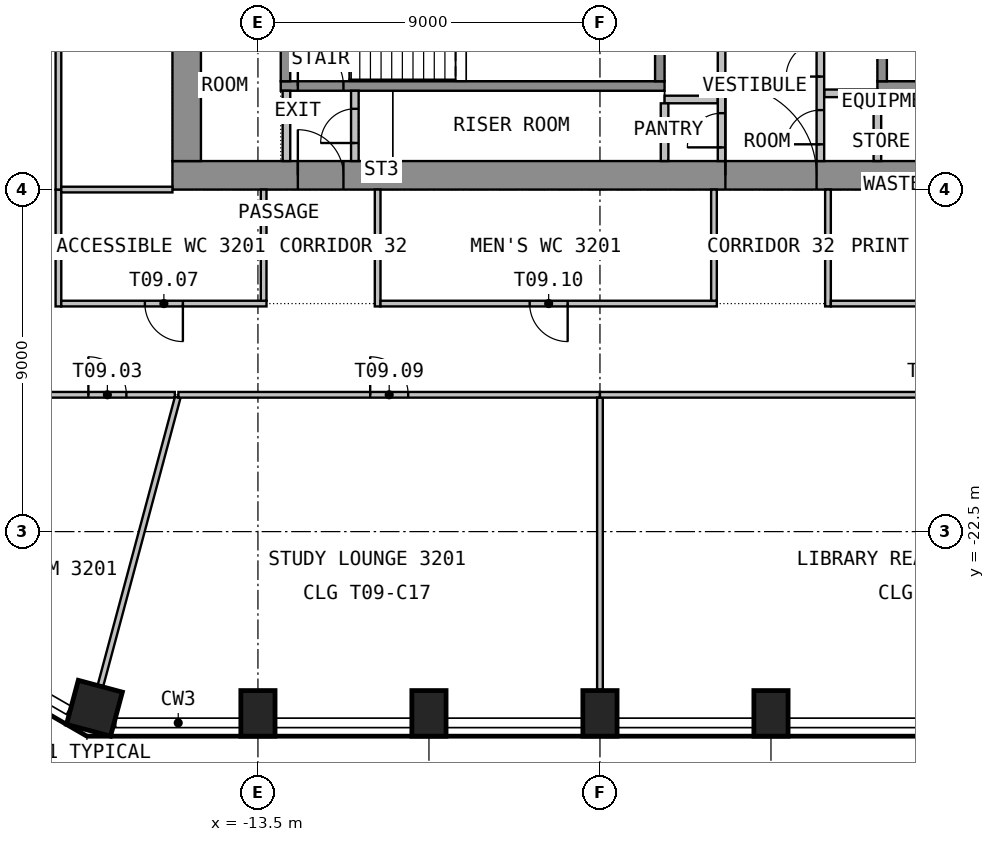
"""IFC4 building model, lengths in metres.
Left out: names, types, materials, properties, quantities, classifications, styles, units other than length and angle.
Written with IfcOpenShell. Run it as: python <this file> out.ifc"""

import sys

from ifc_helpers import new_model, si_unit, direction, frame, frame_2d, origin, origin_2d, place, context, subcontext, project, spatial, rectangle, extrude, element, fill, save


model = new_model("IFC4")
c1 = context("Model", 3, precision=1e-05, world=origin(), true_north=direction((0.0, 1.0)))
c2 = subcontext(c1, "Body", "Model", "MODEL_VIEW")
j1 = project(units=[si_unit("LENGTHUNIT", "METRE"), si_unit("PLANEANGLEUNIT", "RADIAN")], contexts=[c1])
p1 = place(None, origin())
s1 = spatial("IfcSite", under=j1, at=p1, CompositionType="ELEMENT")
p2 = place(p1, origin())
s2 = spatial("IfcBuilding", under=s1, at=p2, CompositionType="ELEMENT")
p3 = place(p2, frame((0.0, 0.0, 132.6)))
s3 = spatial("IfcBuildingStorey", under=s2, at=p3, CompositionType="ELEMENT", Elevation=132.6)
p4 = place(p3, frame((-17.803, -27.148, 0.0), z_axis=(0.0, 0.0, 1.0), x_axis=(0.965925826289, -0.258819045103, 0.0)))
e1 = element("IfcColumn", 1, at=p4, inside=s3, PredefinedType="COLUMN", context=c2, shape_type="SweptSolid", body=[
    extrude(rectangle(XDim=1.2, YDim=1.2, at=origin_2d()), origin(), (0.0, 0.0, 1.0), 3.575),
])
for number, where, z_axis, x_axis in (
    (2, (-13.5, -27.283, 0.0), (0.0, 0.0, 1.0), (1.0, 0.0, 0.0)),
    (3, (-9.0, -27.283, 0.0), (0.0, 0.0, 1.0), (1.0, 0.0, 0.0)),
    (4, (-4.5, -27.283, 0.0), (0.0, 0.0, 1.0), (1.0, 0.0, 0.0)),
    (5, (0.0, -27.283, 0.0), (0.0, 0.0, 1.0), (1.0, 0.0, 0.0)),
):
    element("IfcColumn", number, at=place(p3, frame(where, z_axis=z_axis, x_axis=x_axis)), inside=s3, PredefinedType="COLUMN", context=c2, shape_type="SweptSolid", body=[
        extrude(rectangle(XDim=0.9, YDim=1.2, at=origin_2d()), origin(), (0.0, 0.0, 1.0), 3.575),
    ])
p5 = place(p3, frame((-15.75, -13.125, 0.0), z_axis=(0.0, 0.0, 1.0), x_axis=(1.0, 0.0, 0.0)))
e6 = element("IfcWall", 6, at=p5, inside=s3, PredefinedType="SHEAR", context=c2, shape_type="SweptSolid", body=[
    extrude(rectangle(XDim=31.5, YDim=0.75, at=frame_2d((15.75, 0.0))), origin(), (0.0, 0.0, 1.0), 3.575),
])
p6 = place(p5, frame((14.55, 0.0, 0.0)))
e7 = element("IfcOpeningElement", 7, at=p6, cuts=e6, PredefinedType="OPENING", context=c2, shape_type="SweptSolid", body=[
    extrude(rectangle(XDim=2.4, YDim=2.1, at=frame_2d((1.2, 1.05))), frame((0.0, 0.385, 0.0), z_axis=(0.0, -1.0, 0.0), x_axis=(1.0, 0.0, 0.0)), (0.0, 0.0, 1.0), 0.77),
])
p7 = place(p5, frame((3.3, 0.0, 0.0)))
e8 = element("IfcOpeningElement", 8, at=p7, cuts=e6, PredefinedType="OPENING", context=c2, shape_type="SweptSolid", body=[
    extrude(rectangle(XDim=1.2, YDim=2.1, at=frame_2d((0.6, 1.05))), frame((0.0, 0.385, 0.0), z_axis=(0.0, -1.0, 0.0), x_axis=(1.0, 0.0, 0.0)), (0.0, 0.0, 1.0), 0.77),
])
p8 = place(p5, frame((27.0, 0.0, 0.0)))
e9 = element("IfcOpeningElement", 9, at=p8, cuts=e6, PredefinedType="OPENING", context=c2, shape_type="SweptSolid", body=[
    extrude(rectangle(XDim=1.2, YDim=2.1, at=frame_2d((0.6, 1.05))), frame((0.0, 0.385, 0.0), z_axis=(0.0, -1.0, 0.0), x_axis=(1.0, 0.0, 0.0)), (0.0, 0.0, 1.0), 0.77),
])
p9 = place(p3, frame((-15.375, -12.75, 0.0), z_axis=(0.0, 0.0, 1.0), x_axis=(0.0, 1.0, 0.0)))
e10 = element("IfcWall", 10, at=p9, inside=s3, PredefinedType="SHEAR", context=c2, shape_type="SweptSolid", body=[
    extrude(rectangle(XDim=25.5, YDim=0.75, at=frame_2d((12.75, 0.0))), origin(), (0.0, 0.0, 1.0), 3.575),
])
p10 = place(p9, frame((11.55, 0.0, 0.0)))
e11 = element("IfcOpeningElement", 11, at=p10, cuts=e10, PredefinedType="OPENING", context=c2, shape_type="SweptSolid", body=[
    extrude(rectangle(XDim=2.4, YDim=2.1, at=frame_2d((1.2, 1.05))), frame((0.0, 0.385, 0.0), z_axis=(0.0, -1.0, 0.0), x_axis=(1.0, 0.0, 0.0)), (0.0, 0.0, 1.0), 0.77),
])
p11 = place(p3, frame((-12.9, -10.775, 0.0), z_axis=(0.0, 0.0, 1.0), x_axis=(1.0, 0.0, 0.0)))
e12 = element("IfcWall", 12, at=p11, inside=s3, PredefinedType="SHEAR", context=c2, shape_type="SweptSolid", body=[
    extrude(rectangle(XDim=10.1, YDim=0.25, at=frame_2d((5.05, 0.0))), origin(), (0.0, 0.0, 1.0), 3.575),
])
p12 = place(p11, frame((0.45, 0.0, 0.0)))
e13 = element("IfcOpeningElement", 13, at=p12, cuts=e12, PredefinedType="OPENING", context=c2, shape_type="SweptSolid", body=[
    extrude(rectangle(XDim=1.2, YDim=2.1, at=frame_2d((0.6, 1.05))), frame((0.0, 0.135, 0.0), z_axis=(0.0, -1.0, 0.0), x_axis=(1.0, 0.0, 0.0)), (0.0, 0.0, 1.0), 0.27),
])
for number, where, z_axis, x_axis in (
    (14, (-12.775, -10.65, 0.0), (0.0, 0.0, 1.0), (0.0, 1.0, 0.0)),
    (15, (-2.925, -10.65, 0.0), (0.0, 0.0, 1.0), (0.0, 1.0, 0.0)),
):
    element("IfcWall", number, at=place(p3, frame(where, z_axis=z_axis, x_axis=x_axis)), inside=s3, PredefinedType="SHEAR", context=c2, shape_type="SweptSolid", body=[
        extrude(rectangle(XDim=3.25, YDim=0.25, at=frame_2d((1.625, 0.0))), origin(), (0.0, 0.0, 1.0), 3.575),
    ])
p13 = place(p3, frame((2.8, -10.775, 0.0), z_axis=(0.0, 0.0, 1.0), x_axis=(1.0, 0.0, 0.0)))
e16 = element("IfcWall", 16, at=p13, inside=s3, PredefinedType="SHEAR", context=c2, shape_type="SweptSolid", body=[
    extrude(rectangle(XDim=10.1, YDim=0.25, at=frame_2d((5.05, 0.0))), origin(), (0.0, 0.0, 1.0), 3.575),
])
p14 = place(p13, frame((8.45, 0.0, 0.0)))
e17 = element("IfcOpeningElement", 17, at=p14, cuts=e16, PredefinedType="OPENING", context=c2, shape_type="SweptSolid", body=[
    extrude(rectangle(XDim=1.2, YDim=2.1, at=frame_2d((0.6, 1.05))), frame((0.0, 0.135, 0.0), z_axis=(0.0, -1.0, 0.0), x_axis=(1.0, 0.0, 0.0)), (0.0, 0.0, 1.0), 0.27),
])
p15 = place(p3, frame((2.925, -10.65, 0.0), z_axis=(0.0, 0.0, 1.0), x_axis=(0.0, 1.0, 0.0)))
e18 = element("IfcWall", 18, at=p15, inside=s3, PredefinedType="SHEAR", context=c2, shape_type="SweptSolid", body=[
    extrude(rectangle(XDim=3.25, YDim=0.25, at=frame_2d((1.625, 0.0))), origin(), (0.0, 0.0, 1.0), 3.575),
])
for number, where, z_axis, x_axis in (
    (19, (-2.8, -11.13, 0.0), (0.0, 0.0, 1.0), (1.0, 0.0, 0.0)),
    (20, (1.4, -10.968, 0.0), (0.0, 0.0, 1.0), (1.0, 0.0, 0.0)),
):
    element("IfcWall", number, at=place(p3, frame(where, z_axis=z_axis, x_axis=x_axis)), inside=s3, PredefinedType="PARTITIONING", context=c2, shape_type="SweptSolid", body=[
        extrude(rectangle(XDim=1.4, YDim=0.2, at=frame_2d((0.7, 0.0))), origin(), (0.0, 0.0, 1.0), 3.575),
    ])
p16 = place(p3, frame((-1.3, -12.75, 0.0), z_axis=(0.0, 0.0, 1.0), x_axis=(0.0, 1.0, 0.0)))
e21 = element("IfcWall", 21, at=p16, inside=s3, PredefinedType="PARTITIONING", context=c2, shape_type="SweptSolid", body=[
    extrude(rectangle(XDim=5.6, YDim=0.2, at=frame_2d((2.8, 0.0))), origin(), (0.0, 0.0, 1.0), 3.575),
])
p17 = place(p16, frame((0.36, 0.0, 0.0)))
e22 = element("IfcOpeningElement", 22, at=p17, cuts=e21, PredefinedType="OPENING", context=c2, shape_type="SweptSolid", body=[
    extrude(rectangle(XDim=0.9, YDim=2.1, at=frame_2d((0.45, 1.05))), frame((0.0, 0.11, 0.0), z_axis=(0.0, -1.0, 0.0), x_axis=(1.0, 0.0, 0.0)), (0.0, 0.0, 1.0), 0.22),
])
p18 = place(p16, frame((3.06, 0.0, 0.0)))
e23 = element("IfcOpeningElement", 23, at=p18, cuts=e21, PredefinedType="OPENING", context=c2, shape_type="SweptSolid", body=[
    extrude(rectangle(XDim=0.9, YDim=2.1, at=frame_2d((0.45, 1.05))), frame((0.0, 0.11, 0.0), z_axis=(0.0, -1.0, 0.0), x_axis=(1.0, 0.0, 0.0)), (0.0, 0.0, 1.0), 0.22),
])
p19 = place(p3, frame((1.3, -12.75, 0.0), z_axis=(0.0, 0.0, 1.0), x_axis=(0.0, 1.0, 0.0)))
e24 = element("IfcWall", 24, at=p19, inside=s3, PredefinedType="PARTITIONING", context=c2, shape_type="SweptSolid", body=[
    extrude(rectangle(XDim=5.6, YDim=0.2, at=frame_2d((2.8, 0.0))), origin(), (0.0, 0.0, 1.0), 3.575),
])
p20 = place(p19, frame((0.441, 0.0, 0.0)))
e25 = element("IfcOpeningElement", 25, at=p20, cuts=e24, PredefinedType="OPENING", context=c2, shape_type="SweptSolid", body=[
    extrude(rectangle(XDim=0.9, YDim=2.1, at=frame_2d((0.45, 1.05))), frame((0.0, 0.11, 0.0), z_axis=(0.0, -1.0, 0.0), x_axis=(1.0, 0.0, 0.0)), (0.0, 0.0, 1.0), 0.22),
])
p21 = place(p19, frame((2.223, 0.0, 0.0)))
e26 = element("IfcOpeningElement", 26, at=p21, cuts=e24, PredefinedType="OPENING", context=c2, shape_type="SweptSolid", body=[
    extrude(rectangle(XDim=0.9, YDim=2.1, at=frame_2d((0.45, 1.05))), frame((0.0, 0.11, 0.0), z_axis=(0.0, -1.0, 0.0), x_axis=(1.0, 0.0, 0.0)), (0.0, 0.0, 1.0), 0.22),
])
p22 = place(p19, frame((4.032, 0.0, 0.0)))
e27 = element("IfcOpeningElement", 27, at=p22, cuts=e24, PredefinedType="OPENING", context=c2, shape_type="SweptSolid", body=[
    extrude(rectangle(XDim=0.9, YDim=2.1, at=frame_2d((0.45, 1.05))), frame((0.0, 0.11, 0.0), z_axis=(0.0, -1.0, 0.0), x_axis=(1.0, 0.0, 0.0)), (0.0, 0.0, 1.0), 0.22),
])
p23 = place(p3, frame((-12.75, -12.75, 0.0), z_axis=(0.0, 0.0, 1.0), x_axis=(0.0, 1.0, 0.0)))
e28 = element("IfcWall", 28, at=p23, inside=s3, PredefinedType="PARTITIONING", context=c2, shape_type="SweptSolid", body=[
    extrude(rectangle(XDim=1.85, YDim=0.2, at=frame_2d((0.925, 0.0))), origin(), (0.0, 0.0, 1.0), 3.575),
])
p24 = place(p3, frame((-10.95, -12.75, 0.0), z_axis=(0.0, 0.0, 1.0), x_axis=(0.0, 1.0, 0.0)))
e29 = element("IfcWall", 29, at=p24, inside=s3, PredefinedType="PARTITIONING", context=c2, shape_type="SweptSolid", body=[
    extrude(rectangle(XDim=1.85, YDim=0.2, at=frame_2d((0.925, 0.0))), origin(), (0.0, 0.0, 1.0), 3.575),
])
p25 = place(p24, frame((0.475, 0.0, 0.0)))
e30 = element("IfcOpeningElement", 30, at=p25, cuts=e29, PredefinedType="OPENING", context=c2, shape_type="SweptSolid", body=[
    extrude(rectangle(XDim=0.9, YDim=2.1, at=frame_2d((0.45, 1.05))), frame((0.0, 0.11, 0.0), z_axis=(0.0, -1.0, 0.0), x_axis=(1.0, 0.0, 0.0)), (0.0, 0.0, 1.0), 0.22),
])
p26 = place(p3, frame((-19.236, -18.9, 0.0), z_axis=(0.0, 0.0, 1.0), x_axis=(1.0, 0.0, 0.0)))
e31 = element("IfcWall", 31, at=p26, inside=s3, PredefinedType="PARTITIONING", context=c2, shape_type="SweptSolid", body=[
    extrude(rectangle(XDim=3.548, YDim=0.15, at=frame_2d((1.774, 0.0))), origin(), (0.0, 0.0, 1.0), 3.575),
])
p27 = place(p26, frame((1.274, 0.0, 0.0)))
e32 = element("IfcOpeningElement", 32, at=p27, cuts=e31, PredefinedType="OPENING", context=c2, shape_type="SweptSolid", body=[
    extrude(rectangle(XDim=1.0, YDim=2.1, at=frame_2d((0.5, 1.05))), frame((0.0, 0.085, 0.0), z_axis=(0.0, -1.0, 0.0), x_axis=(1.0, 0.0, 0.0)), (0.0, 0.0, 1.0), 0.17),
])
p28 = place(p3, frame((-18.75, -16.575, 0.0), z_axis=(0.0, 0.0, 1.0), x_axis=(0.0, 1.0, 0.0)))
e33 = element("IfcWall", 33, at=p28, inside=s3, PredefinedType="PARTITIONING", context=c2, shape_type="SweptSolid", body=[
    extrude(rectangle(XDim=3.075, YDim=0.15, at=frame_2d((1.538, 0.0))), origin(), (0.0, 0.0, 1.0), 3.575),
])
p29 = place(p3, frame((-13.275, -16.5, 0.0), z_axis=(0.0, 0.0, 1.0), x_axis=(-1.0, 0.0, 0.0)))
e34 = element("IfcWall", 34, at=p29, inside=s3, PredefinedType="PARTITIONING", context=c2, shape_type="SweptSolid", body=[
    extrude(rectangle(XDim=5.4, YDim=0.15, at=frame_2d((2.7, 0.0))), origin(), (0.0, 0.0, 1.0), 3.575),
])
p30 = place(p29, frame((2.2, 0.0, 0.0)))
e35 = element("IfcOpeningElement", 35, at=p30, cuts=e34, PredefinedType="OPENING", context=c2, shape_type="SweptSolid", body=[
    extrude(rectangle(XDim=1.0, YDim=2.1, at=frame_2d((0.5, 1.05))), frame((0.0, 0.085, 0.0), z_axis=(0.0, -1.0, 0.0), x_axis=(1.0, 0.0, 0.0)), (0.0, 0.0, 1.0), 0.17),
])
p31 = place(p3, frame((-18.75, -13.5, 0.0), z_axis=(0.0, 0.0, 1.0), x_axis=(0.0, 1.0, 0.0)))
e36 = element("IfcWall", 36, at=p31, inside=s3, PredefinedType="PARTITIONING", context=c2, shape_type="SweptSolid", body=[
    extrude(rectangle(XDim=12.075, YDim=0.15, at=frame_2d((6.038, 0.0))), origin(), (0.0, 0.0, 1.0), 3.575),
])
p32 = place(p31, frame((5.538, 0.0, 0.0)))
e37 = element("IfcOpeningElement", 37, at=p32, cuts=e36, PredefinedType="OPENING", context=c2, shape_type="SweptSolid", body=[
    extrude(rectangle(XDim=1.0, YDim=2.1, at=frame_2d((0.5, 1.05))), frame((0.0, 0.085, 0.0), z_axis=(0.0, -1.0, 0.0), x_axis=(1.0, 0.0, 0.0)), (0.0, 0.0, 1.0), 0.17),
])
p33 = place(p3, frame((-15.75, -13.5, 0.0), z_axis=(0.0, 0.0, 1.0), x_axis=(-1.0, 0.0, 0.0)))
e38 = element("IfcWall", 38, at=p33, inside=s3, PredefinedType="PARTITIONING", context=c2, shape_type="SweptSolid", body=[
    extrude(rectangle(XDim=2.925, YDim=0.15, at=frame_2d((1.462, 0.0))), origin(), (0.0, 0.0, 1.0), 3.575),
])
p34 = place(p3, frame((-15.612, -18.972, 0.0), z_axis=(0.0, 0.0, 1.0), x_axis=(-0.258869363255, -0.965912342176, 0.0)))
e39 = element("IfcWall", 39, at=p34, inside=s3, PredefinedType="PARTITIONING", context=c2, shape_type="SweptSolid", body=[
    extrude(rectangle(XDim=7.844, YDim=0.15, at=frame_2d((3.922, 0.0))), origin(), (0.0, 0.0, 1.0), 3.575),
])
p35 = place(p3, frame((-15.593, -18.9, 0.0), z_axis=(0.0, 0.0, 1.0), x_axis=(1.0, 0.0, 0.0)))
e40 = element("IfcWall", 40, at=p35, inside=s3, PredefinedType="PARTITIONING", context=c2, shape_type="SweptSolid", body=[
    extrude(rectangle(XDim=11.093, YDim=0.15, at=frame_2d((5.546, 0.0))), origin(), (0.0, 0.0, 1.0), 3.575),
])
p36 = place(p35, frame((5.046, 0.0, 0.0)))
e41 = element("IfcOpeningElement", 41, at=p36, cuts=e40, PredefinedType="OPENING", context=c2, shape_type="SweptSolid", body=[
    extrude(rectangle(XDim=1.0, YDim=2.1, at=frame_2d((0.5, 1.05))), frame((0.0, 0.085, 0.0), z_axis=(0.0, -1.0, 0.0), x_axis=(1.0, 0.0, 0.0)), (0.0, 0.0, 1.0), 0.17),
])
p37 = place(p3, frame((-13.35, -13.5, 0.0), z_axis=(0.0, 0.0, 1.0), x_axis=(0.0, -1.0, 0.0)))
e42 = element("IfcWall", 42, at=p37, inside=s3, PredefinedType="PARTITIONING", context=c2, shape_type="SweptSolid", body=[
    extrude(rectangle(XDim=2.925, YDim=0.15, at=frame_2d((1.462, 0.0))), origin(), (0.0, 0.0, 1.0), 3.575),
])
p38 = place(p3, frame((-10.35, -16.575, 0.0), z_axis=(0.0, 0.0, 1.0), x_axis=(0.0, 1.0, 0.0)))
e43 = element("IfcWall", 43, at=p38, inside=s3, PredefinedType="PARTITIONING", context=c2, shape_type="SweptSolid", body=[
    extrude(rectangle(XDim=3.075, YDim=0.15, at=frame_2d((1.538, 0.0))), origin(), (0.0, 0.0, 1.0), 3.575),
])
p39 = place(p3, frame((-1.425, -16.5, 0.0), z_axis=(0.0, 0.0, 1.0), x_axis=(-1.0, 0.0, 0.0)))
e44 = element("IfcWall", 44, at=p39, inside=s3, PredefinedType="PARTITIONING", context=c2, shape_type="SweptSolid", body=[
    extrude(rectangle(XDim=8.85, YDim=0.15, at=frame_2d((4.425, 0.0))), origin(), (0.0, 0.0, 1.0), 3.575),
])
p40 = place(p39, frame((3.925, 0.0, 0.0)))
e45 = element("IfcOpeningElement", 45, at=p40, cuts=e44, PredefinedType="OPENING", context=c2, shape_type="SweptSolid", body=[
    extrude(rectangle(XDim=1.0, YDim=2.1, at=frame_2d((0.5, 1.05))), frame((0.0, 0.085, 0.0), z_axis=(0.0, -1.0, 0.0), x_axis=(1.0, 0.0, 0.0)), (0.0, 0.0, 1.0), 0.17),
])
p41 = place(p3, frame((-4.5, -18.975, 0.0), z_axis=(0.0, 0.0, 1.0), x_axis=(0.0, -1.0, 0.0)))
e46 = element("IfcWall", 46, at=p41, inside=s3, PredefinedType="PARTITIONING", context=c2, shape_type="SweptSolid", body=[
    extrude(rectangle(XDim=7.688, YDim=0.15, at=frame_2d((3.844, 0.0))), origin(), (0.0, 0.0, 1.0), 3.575),
])
p42 = place(p3, frame((-4.5, -18.9, 0.0), z_axis=(0.0, 0.0, 1.0), x_axis=(1.0, 0.0, 0.0)))
e47 = element("IfcWall", 47, at=p42, inside=s3, PredefinedType="PARTITIONING", context=c2, shape_type="SweptSolid", body=[
    extrude(rectangle(XDim=18.0, YDim=0.15, at=frame_2d((9.0, 0.0))), origin(), (0.0, 0.0, 1.0), 3.575),
])
p43 = place(p42, frame((8.5, 0.0, 0.0)))
e48 = element("IfcOpeningElement", 48, at=p43, cuts=e47, PredefinedType="OPENING", context=c2, shape_type="SweptSolid", body=[
    extrude(rectangle(XDim=1.0, YDim=2.1, at=frame_2d((0.5, 1.05))), frame((0.0, 0.085, 0.0), z_axis=(0.0, -1.0, 0.0), x_axis=(1.0, 0.0, 0.0)), (0.0, 0.0, 1.0), 0.17),
])
p44 = place(p3, frame((-1.5, -13.5, 0.0), z_axis=(0.0, 0.0, 1.0), x_axis=(0.0, -1.0, 0.0)))
e49 = element("IfcWall", 49, at=p44, inside=s3, PredefinedType="PARTITIONING", context=c2, shape_type="SweptSolid", body=[
    extrude(rectangle(XDim=2.925, YDim=0.15, at=frame_2d((1.462, 0.0))), origin(), (0.0, 0.0, 1.0), 3.575),
])
p45 = place(p3, frame((1.5, -16.575, 0.0), z_axis=(0.0, 0.0, 1.0), x_axis=(0.0, 1.0, 0.0)))
e50 = element("IfcWall", 50, at=p45, inside=s3, PredefinedType="PARTITIONING", context=c2, shape_type="SweptSolid", body=[
    extrude(rectangle(XDim=3.075, YDim=0.15, at=frame_2d((1.538, 0.0))), origin(), (0.0, 0.0, 1.0), 3.575),
])
p46 = place(p3, frame((10.425, -16.5, 0.0), z_axis=(0.0, 0.0, 1.0), x_axis=(-1.0, 0.0, 0.0)))
e51 = element("IfcWall", 51, at=p46, inside=s3, PredefinedType="PARTITIONING", context=c2, shape_type="SweptSolid", body=[
    extrude(rectangle(XDim=8.85, YDim=0.15, at=frame_2d((4.425, 0.0))), origin(), (0.0, 0.0, 1.0), 3.575),
])
p47 = place(p46, frame((3.925, 0.0, 0.0)))
e52 = element("IfcOpeningElement", 52, at=p47, cuts=e51, PredefinedType="OPENING", context=c2, shape_type="SweptSolid", body=[
    extrude(rectangle(XDim=1.0, YDim=2.1, at=frame_2d((0.5, 1.05))), frame((0.0, 0.085, 0.0), z_axis=(0.0, -1.0, 0.0), x_axis=(1.0, 0.0, 0.0)), (0.0, 0.0, 1.0), 0.17),
])
p48 = place(p3, frame((-2.8, -12.749, 0.0), z_axis=(0.0, 0.0, 1.0), x_axis=(0.0, 1.0, 0.0)))
e53 = element("IfcWall", 53, at=p48, inside=s3, PredefinedType="PARTITIONING", context=c2, shape_type="SweptSolid", body=[
    extrude(rectangle(XDim=1.518, YDim=0.2, at=frame_2d((0.759, 0.0))), origin(), (0.0, 0.0, 1.0), 3.575),
])
p49 = place(p3, frame((2.8, -11.069, 0.0), z_axis=(0.0, 0.0, 1.0), x_axis=(0.0, -1.0, 0.0)))
e54 = element("IfcWall", 54, at=p49, inside=s3, PredefinedType="PARTITIONING", context=c2, shape_type="SweptSolid", body=[
    extrude(rectangle(XDim=1.68, YDim=0.2, at=frame_2d((0.84, 0.0))), origin(), (0.0, 0.0, 1.0), 3.575),
])
p50 = place(p6, origin())
e55 = element("IfcDoor", 55, at=p50, inside=s3, OperationType="DOUBLE_DOOR_DOUBLE_SWING", PredefinedType="DOOR", context=c2, shape_type="SweptSolid", body=[
    extrude(rectangle(XDim=2.4, YDim=2.1, at=frame_2d((1.2, 1.05))), frame((0.0, 0.025, 0.0), z_axis=(0.0, -1.0, 0.0), x_axis=(1.0, 0.0, 0.0)), (0.0, 0.0, 1.0), 0.05),
])
fill(e7, e55)
p51 = place(p7, origin())
e56 = element("IfcDoor", 56, at=p51, inside=s3, OperationType="SINGLE_SWING_RIGHT", PredefinedType="DOOR", context=c2, shape_type="SweptSolid", body=[
    extrude(rectangle(XDim=1.2, YDim=2.1, at=frame_2d((0.6, 1.05))), frame((0.0, 0.025, 0.0), z_axis=(0.0, -1.0, 0.0), x_axis=(1.0, 0.0, 0.0)), (0.0, 0.0, 1.0), 0.05),
])
fill(e8, e56)
p52 = place(p17, origin())
e57 = element("IfcDoor", 57, at=p52, inside=s3, OperationType="SINGLE_SWING_LEFT", PredefinedType="DOOR", context=c2, shape_type="SweptSolid", body=[
    extrude(rectangle(XDim=0.9, YDim=2.1, at=frame_2d((0.45, 1.05))), frame((0.0, 0.025, 0.0), z_axis=(0.0, -1.0, 0.0), x_axis=(1.0, 0.0, 0.0)), (0.0, 0.0, 1.0), 0.05),
])
fill(e22, e57)
p53 = place(p20, origin())
e58 = element("IfcDoor", 58, at=p53, inside=s3, OperationType="SINGLE_SWING_LEFT", PredefinedType="DOOR", context=c2, shape_type="SweptSolid", body=[
    extrude(rectangle(XDim=0.9, YDim=2.1, at=frame_2d((0.45, 1.05))), frame((0.0, 0.025, 0.0), z_axis=(0.0, -1.0, 0.0), x_axis=(1.0, 0.0, 0.0)), (0.0, 0.0, 1.0), 0.05),
])
fill(e25, e58)
p54 = place(p21, origin())
e59 = element("IfcDoor", 59, at=p54, inside=s3, OperationType="SINGLE_SWING_LEFT", PredefinedType="DOOR", context=c2, shape_type="SweptSolid", body=[
    extrude(rectangle(XDim=0.9, YDim=2.1, at=frame_2d((0.45, 1.05))), frame((0.0, 0.025, 0.0), z_axis=(0.0, -1.0, 0.0), x_axis=(1.0, 0.0, 0.0)), (0.0, 0.0, 1.0), 0.05),
])
fill(e26, e59)
p55 = place(p12, origin())
e60 = element("IfcDoor", 60, at=p55, inside=s3, OperationType="SINGLE_SWING_RIGHT", PredefinedType="DOOR", context=c2, shape_type="SweptSolid", body=[
    extrude(rectangle(XDim=1.2, YDim=2.1, at=frame_2d((0.6, 1.05))), frame((0.0, 0.025, 0.0), z_axis=(0.0, -1.0, 0.0), x_axis=(1.0, 0.0, 0.0)), (0.0, 0.0, 1.0), 0.05),
])
fill(e13, e60)
p56 = place(p25, origin())
e61 = element("IfcDoor", 61, at=p56, inside=s3, OperationType="SINGLE_SWING_LEFT", PredefinedType="DOOR", context=c2, shape_type="SweptSolid", body=[
    extrude(rectangle(XDim=0.9, YDim=2.1, at=frame_2d((0.45, 1.05))), frame((0.0, 0.025, 0.0), z_axis=(0.0, -1.0, 0.0), x_axis=(1.0, 0.0, 0.0)), (0.0, 0.0, 1.0), 0.05),
])
fill(e30, e61)
p57 = place(p27, origin())
e62 = element("IfcDoor", 62, at=p57, inside=s3, OperationType="SINGLE_SWING_LEFT", PredefinedType="DOOR", context=c2, shape_type="SweptSolid", body=[
    extrude(rectangle(XDim=1.0, YDim=2.1, at=frame_2d((0.5, 1.05))), frame((0.0, 0.025, 0.0), z_axis=(0.0, -1.0, 0.0), x_axis=(1.0, 0.0, 0.0)), (0.0, 0.0, 1.0), 0.05),
])
fill(e32, e62)
p58 = place(p30, origin())
e63 = element("IfcDoor", 63, at=p58, inside=s3, OperationType="SINGLE_SWING_RIGHT", PredefinedType="DOOR", context=c2, shape_type="SweptSolid", body=[
    extrude(rectangle(XDim=1.0, YDim=2.1, at=frame_2d((0.5, 1.05))), frame((0.0, 0.025, 0.0), z_axis=(0.0, -1.0, 0.0), x_axis=(1.0, 0.0, 0.0)), (0.0, 0.0, 1.0), 0.05),
])
fill(e35, e63)
p59 = place(p36, origin())
e64 = element("IfcDoor", 64, at=p59, inside=s3, OperationType="SINGLE_SWING_RIGHT", PredefinedType="DOOR", context=c2, shape_type="SweptSolid", body=[
    extrude(rectangle(XDim=1.0, YDim=2.1, at=frame_2d((0.5, 1.05))), frame((0.0, 0.025, 0.0), z_axis=(0.0, -1.0, 0.0), x_axis=(1.0, 0.0, 0.0)), (0.0, 0.0, 1.0), 0.05),
])
fill(e41, e64)
p60 = place(p40, origin())
e65 = element("IfcDoor", 65, at=p60, inside=s3, OperationType="SINGLE_SWING_RIGHT", PredefinedType="DOOR", context=c2, shape_type="SweptSolid", body=[
    extrude(rectangle(XDim=1.0, YDim=2.1, at=frame_2d((0.5, 1.05))), frame((0.0, 0.025, 0.0), z_axis=(0.0, -1.0, 0.0), x_axis=(1.0, 0.0, 0.0)), (0.0, 0.0, 1.0), 0.05),
])
fill(e45, e65)
save(model, sys.argv[1])
